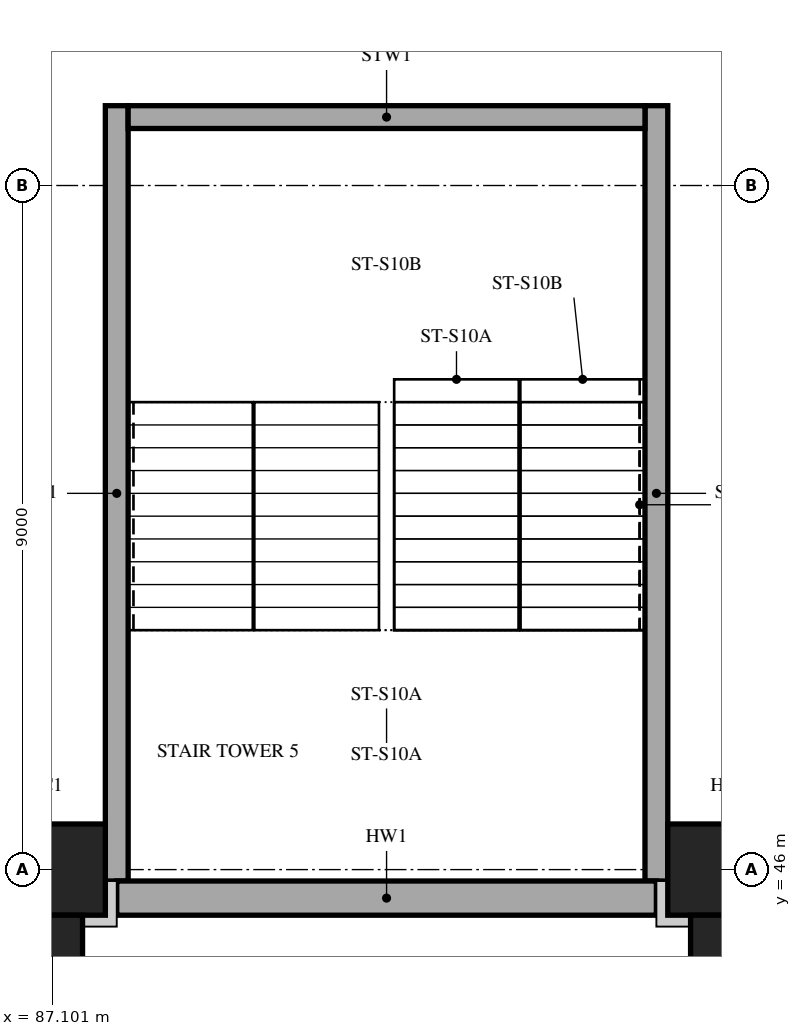
"""IFC4 building model, lengths in metres.
Left out: names, types, materials, properties, quantities, classifications, styles, units other than length and angle.
Written with IfcOpenShell. Run it as: python <this file> out.ifc"""

import sys

from ifc_helpers import new_model, si_unit, direction, frame, frame_2d, origin, origin_2d, place, context, subcontext, project, spatial, rectangle, extrude, element, save


model = new_model("IFC4")
c1 = context("Model", 3, precision=1e-05, world=origin(), true_north=direction((0.0, 1.0)))
c2 = subcontext(c1, "Body", "Model", "MODEL_VIEW")
j1 = project(units=[si_unit("LENGTHUNIT", "METRE"), si_unit("PLANEANGLEUNIT", "RADIAN")], contexts=[c1])
p1 = place(None, origin())
s1 = spatial("IfcSite", under=j1, at=p1, CompositionType="ELEMENT")
p2 = place(p1, origin())
s2 = spatial("IfcBuilding", under=s1, at=p2, CompositionType="ELEMENT")
p3 = place(p2, frame((0.0, 0.0, 5.0)))
s3 = spatial("IfcBuildingStorey", under=s2, at=p3, CompositionType="ELEMENT", Elevation=5.0)
for number, where, z_axis, x_axis in (
    (1, (87.0, 46.0, 0.0), (0.0, 0.0, 1.0), (1.0, 0.0, 0.0)),
    (2, (96.0, 46.0, 0.0), (0.0, 0.0, 1.0), (1.0, 0.0, 0.0)),
):
    element("IfcColumn", number, at=place(p3, frame(where, z_axis=z_axis, x_axis=x_axis)), inside=s3, PredefinedType="COLUMN", context=c2, shape_type="SweptSolid", body=[
        extrude(rectangle(XDim=1.6, YDim=1.2, at=origin_2d()), origin(), (0.0, 0.0, 1.0), 5.0),
    ])
for number, where, z_axis, x_axis in (
    (3, (87.95, 45.85, 0.0), (0.0, 0.0, 1.0), (0.0, 1.0, 0.0)),
    (4, (95.05, 45.85, 0.0), (0.0, 0.0, 1.0), (0.0, 1.0, 0.0)),
):
    element("IfcWall", number, at=place(p3, frame(where, z_axis=z_axis, x_axis=x_axis)), inside=s3, PredefinedType="SHEAR", context=c2, shape_type="SweptSolid", body=[
        extrude(rectangle(XDim=10.2, YDim=0.3, at=frame_2d((5.1, 0.0))), origin(), (0.0, 0.0, 1.0), 5.0),
    ])
p4 = place(p3, frame((88.1, 55.9, 0.0), z_axis=(0.0, 0.0, 1.0), x_axis=(1.0, 0.0, 0.0)))
e5 = element("IfcWall", 5, at=p4, inside=s3, PredefinedType="SHEAR", context=c2, shape_type="SweptSolid", body=[
    extrude(rectangle(XDim=6.8, YDim=0.3, at=frame_2d((3.4, 0.0))), origin(), (0.0, 0.0, 1.0), 5.0),
])
for number, where, z_axis, x_axis in (
    (6, (87.0, 44.9, 0.0), (0.0, 0.0, 1.0), (1.0, 0.0, 0.0)),
    (7, (96.0, 44.9, 0.0), (0.0, 0.0, 1.0), (1.0, 0.0, 0.0)),
):
    element("IfcColumn", number, at=place(p3, frame(where, z_axis=z_axis, x_axis=x_axis)), inside=s3, PredefinedType="COLUMN", context=c2, shape_type="SweptSolid", body=[
        extrude(rectangle(XDim=1.0, YDim=1.0, at=origin_2d()), origin(), (0.0, 0.0, 1.0), 5.0),
    ])
p5 = place(p3, frame((87.95, 45.625, 0.0), z_axis=(0.0, 0.0, 1.0), x_axis=(1.0, 0.0, 0.0)))
e8 = element("IfcWall", 8, at=p5, inside=s3, PredefinedType="SOLIDWALL", context=c2, shape_type="SweptSolid", body=[
    extrude(rectangle(XDim=7.1, YDim=0.45, at=frame_2d((3.55, 0.0))), origin(), (0.0, 0.0, 1.0), 5.0),
])
save(model, sys.argv[1])
